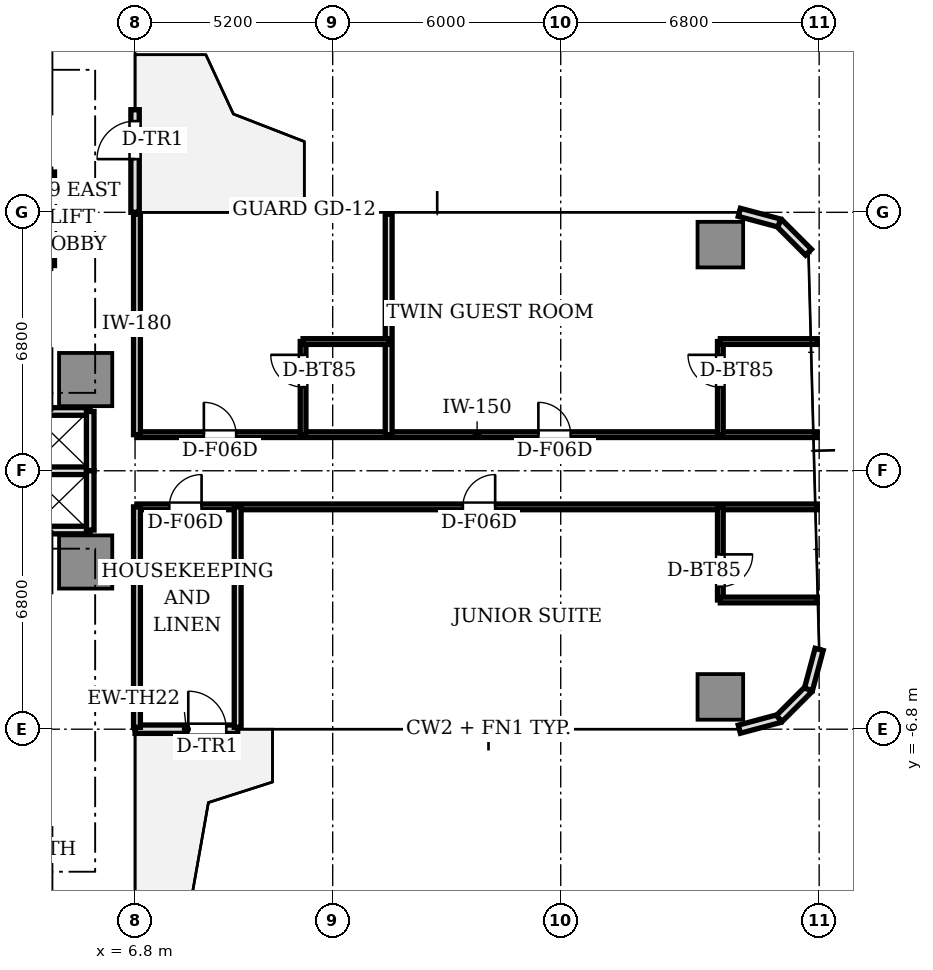
"""IFC4 building model, lengths in metres.
Left out: names, types, materials, properties, quantities, classifications, styles, units other than length and angle.
Written with IfcOpenShell. Run it as: python <this file> out.ifc"""

import sys

from ifc_helpers import new_model, si_unit, direction, frame, frame_2d, origin, origin_2d, place, context, subcontext, project, spatial, rectangle, extrude, source, transform, mapped, element, fill, save


model = new_model("IFC4")
c1 = context("Model", 3, precision=1e-05, world=origin(), true_north=direction((0.0, 1.0)))
c2 = subcontext(c1, "Body", "Model", "MODEL_VIEW")
j1 = project(units=[si_unit("LENGTHUNIT", "METRE"), si_unit("PLANEANGLEUNIT", "RADIAN")], contexts=[c1])
p1 = place(None, origin())
s1 = spatial("IfcSite", under=j1, at=p1, CompositionType="ELEMENT")
p2 = place(p1, origin())
s2 = spatial("IfcBuilding", under=s1, at=p2, CompositionType="ELEMENT")
p3 = place(p2, frame((0.0, 0.0, 71.15)))
s3 = spatial("IfcBuildingStorey", under=s2, at=p3, CompositionType="ELEMENT", Elevation=71.15)
m1 = source(origin(), c2, "Body", "SweptSolid", [
    extrude(rectangle(XDim=1.4, YDim=1.4, at=origin_2d()), origin(), (0.0, 0.0, 1.0), 3.03),
])
for number, where, z_axis, x_axis in (
    (1, (5.5, 2.4, 0.0), (0.0, 0.0, 1.0), (1.0, 0.0, 0.0)),
    (2, (5.5, -2.4, 0.0), (0.0, 0.0, 1.0), (1.0, 0.0, 0.0)),
):
    element("IfcColumn", number, at=place(p3, frame(where, z_axis=z_axis, x_axis=x_axis)), inside=s3, PredefinedType="COLUMN", context=c2, shape_type="MappedRepresentation", body=[
        mapped(m1, transform((0.0, 0.0, 0.0), scale=1.0)),
    ])
m2 = source(origin(), c2, "Body", "SweptSolid", [
    extrude(rectangle(XDim=1.2, YDim=1.2, at=origin_2d()), origin(), (0.0, 0.0, 1.0), 3.03),
])
for number, where, z_axis, x_axis in (
    (3, (22.2, -5.95, 0.0), (0.0, 0.0, 1.0), (1.0, 0.0, 0.0)),
    (4, (22.2, 5.95, 0.0), (0.0, 0.0, 1.0), (1.0, 0.0, 0.0)),
):
    element("IfcColumn", number, at=place(p3, frame(where, z_axis=z_axis, x_axis=x_axis)), inside=s3, PredefinedType="COLUMN", context=c2, shape_type="MappedRepresentation", body=[
        mapped(m2, transform((0.0, 0.0, 0.0), scale=1.0)),
    ])
p4 = place(p3, frame((6.8, -6.8, 0.0), z_axis=(0.0, 0.0, 1.0), x_axis=(1.0, 0.0, 0.0)))
e5 = element("IfcWall", 5, at=p4, inside=s3, PredefinedType="STANDARD", context=c2, shape_type="SweptSolid", body=[
    extrude(rectangle(XDim=2.7, YDim=0.22, at=frame_2d((1.35, 0.0))), origin(), (0.0, 0.0, 1.0), 3.03),
])
p5 = place(p4, frame((1.4, 0.0, 0.0)))
e6 = element("IfcOpeningElement", 6, at=p5, cuts=e5, PredefinedType="OPENING", context=c2, shape_type="SweptSolid", body=[
    extrude(rectangle(XDim=1.0, YDim=2.2, at=frame_2d((0.5, 1.1))), frame((0.0, 0.12, 0.0), z_axis=(0.0, -1.0, 0.0), x_axis=(1.0, 0.0, 0.0)), (0.0, 0.0, 1.0), 0.24),
])
for number, where, z_axis, x_axis in (
    (7, (22.7, -6.8, 0.0), (0.0, 0.0, 1.0), (0.966, 0.259, 0.0)),
    (8, (23.75, -6.519, 0.0), (0.0, 0.0, 1.0), (0.707, 0.707, 0.0)),
    (9, (24.519, -5.75, 0.0), (0.0, 0.0, 1.0), (0.259, 0.966, 0.0)),
    (10, (24.519, 5.75, 0.0), (0.0, 0.0, 1.0), (-0.707, 0.707, 0.0)),
    (11, (23.75, 6.519, 0.0), (0.0, 0.0, 1.0), (-0.966, 0.259, 0.0)),
):
    element("IfcWall", number, at=place(p3, frame(where, z_axis=z_axis, x_axis=x_axis)), inside=s3, PredefinedType="STANDARD", context=c2, shape_type="SweptSolid", body=[
        extrude(rectangle(XDim=1.087, YDim=0.22, at=frame_2d((0.543, 0.0))), origin(), (0.0, 0.0, 1.0), 3.03),
    ])
p6 = place(p3, frame((6.8, 6.8, 0.0), z_axis=(0.0, 0.0, 1.0), x_axis=(0.0, 1.0, 0.0)))
e12 = element("IfcWall", 12, at=p6, inside=s3, PredefinedType="STANDARD", context=c2, shape_type="SweptSolid", body=[
    extrude(rectangle(XDim=2.7, YDim=0.22, at=frame_2d((1.35, 0.0))), origin(), (0.0, 0.0, 1.0), 3.03),
])
p7 = place(p6, frame((1.4, 0.0, 0.0)))
e13 = element("IfcOpeningElement", 13, at=p7, cuts=e12, PredefinedType="OPENING", context=c2, shape_type="SweptSolid", body=[
    extrude(rectangle(XDim=1.0, YDim=2.2, at=frame_2d((0.5, 1.1))), frame((0.0, 0.12, 0.0), z_axis=(0.0, -1.0, 0.0), x_axis=(1.0, 0.0, 0.0)), (0.0, 0.0, 1.0), 0.24),
])
for number, where, z_axis, x_axis in (
    (14, (3.98, 1.56, 0.0), (0.0, 0.0, 1.0), (1.0, 0.0, 0.0)),
    (15, (3.98, -1.56, 0.0), (0.0, 0.0, 1.0), (1.0, 0.0, 0.0)),
    (16, (3.98, 0.0, 0.0), (0.0, 0.0, 1.0), (1.0, 0.0, 0.0)),
):
    element("IfcWall", number, at=place(p3, frame(where, z_axis=z_axis, x_axis=x_axis)), inside=s3, PredefinedType="SOLIDWALL", context=c2, shape_type="SweptSolid", body=[
        extrude(rectangle(XDim=1.64, YDim=0.2, at=frame_2d((0.82, 0.0))), origin(), (0.0, 0.0, 1.0), 2.58),
    ])
for number, where, z_axis, x_axis in (
    (17, (5.62, 0.0, 0.0), (0.0, 0.0, 1.0), (0.0, 1.0, 0.0)),
    (18, (5.62, -1.56, 0.0), (0.0, 0.0, 1.0), (0.0, 1.0, 0.0)),
):
    element("IfcWall", number, at=place(p3, frame(where, z_axis=z_axis, x_axis=x_axis)), inside=s3, PredefinedType="SOLIDWALL", context=c2, shape_type="SweptSolid", body=[
        extrude(rectangle(XDim=1.56, YDim=0.2, at=frame_2d((0.78, 0.0))), origin(), (0.0, 0.0, 1.0), 2.58),
    ])
p8 = place(p3, frame((4.58, 5.4, 0.0), z_axis=(0.0, 0.0, 1.0), x_axis=(0.0, 1.0, 0.0)))
e19 = element("IfcWall", 19, at=p8, inside=s3, PredefinedType="SOLIDWALL", context=c2, shape_type="SweptSolid", body=[
    extrude(rectangle(XDim=2.46, YDim=0.2, at=frame_2d((1.23, 0.0))), origin(), (0.0, 0.0, 1.0), 2.58),
])
p9 = place(p8, frame((0.2, 0.0, 0.0)))
e20 = element("IfcOpeningElement", 20, at=p9, cuts=e19, PredefinedType="OPENING", context=c2, shape_type="SweptSolid", body=[
    extrude(rectangle(XDim=0.85, YDim=2.1, at=frame_2d((0.425, 1.05))), frame((0.0, 0.11, 0.0), z_axis=(0.0, -1.0, 0.0), x_axis=(1.0, 0.0, 0.0)), (0.0, 0.0, 1.0), 0.22),
])
p10 = place(p8, frame((1.38, 0.0, 0.0)))
e21 = element("IfcOpeningElement", 21, at=p10, cuts=e19, PredefinedType="OPENING", context=c2, shape_type="SweptSolid", body=[
    extrude(rectangle(XDim=0.85, YDim=2.1, at=frame_2d((0.425, 1.05))), frame((0.0, 0.11, 0.0), z_axis=(0.0, -1.0, 0.0), x_axis=(1.0, 0.0, 0.0)), (0.0, 0.0, 1.0), 0.22),
])
p11 = place(p3, frame((6.85, 0.95, 0.0), z_axis=(0.0, 0.0, 1.0), x_axis=(1.0, 0.0, 0.0)))
e22 = element("IfcWall", 22, at=p11, inside=s3, PredefinedType="PARTITIONING", context=c2, shape_type="SweptSolid", body=[
    extrude(rectangle(XDim=17.9, YDim=0.15, at=frame_2d((8.95, 0.0))), origin(), (0.0, 0.0, 1.0), 2.58),
])
p12 = place(p11, frame((1.76, 0.0, 0.0)))
e23 = element("IfcOpeningElement", 23, at=p12, cuts=e22, PredefinedType="OPENING", context=c2, shape_type="SweptSolid", body=[
    extrude(rectangle(XDim=0.85, YDim=2.1, at=frame_2d((0.425, 1.05))), frame((0.0, 0.085, 0.0), z_axis=(0.0, -1.0, 0.0), x_axis=(1.0, 0.0, 0.0)), (0.0, 0.0, 1.0), 0.17),
])
p13 = place(p11, frame((10.562, 0.0, 0.0)))
e24 = element("IfcOpeningElement", 24, at=p13, cuts=e22, PredefinedType="OPENING", context=c2, shape_type="SweptSolid", body=[
    extrude(rectangle(XDim=0.85, YDim=2.1, at=frame_2d((0.425, 1.05))), frame((0.0, 0.085, 0.0), z_axis=(0.0, -1.0, 0.0), x_axis=(1.0, 0.0, 0.0)), (0.0, 0.0, 1.0), 0.17),
])
p14 = place(p3, frame((6.85, -0.95, 0.0), z_axis=(0.0, 0.0, 1.0), x_axis=(1.0, 0.0, 0.0)))
e25 = element("IfcWall", 25, at=p14, inside=s3, PredefinedType="PARTITIONING", context=c2, shape_type="SweptSolid", body=[
    extrude(rectangle(XDim=17.9, YDim=0.15, at=frame_2d((8.95, 0.0))), origin(), (0.0, 0.0, 1.0), 2.58),
])
p15 = place(p14, frame((0.85, 0.0, 0.0)))
e26 = element("IfcOpeningElement", 26, at=p15, cuts=e25, PredefinedType="OPENING", context=c2, shape_type="SweptSolid", body=[
    extrude(rectangle(XDim=0.85, YDim=2.1, at=frame_2d((0.425, 1.05))), frame((0.0, 0.085, 0.0), z_axis=(0.0, -1.0, 0.0), x_axis=(1.0, 0.0, 0.0)), (0.0, 0.0, 1.0), 0.17),
])
p16 = place(p14, frame((8.575, 0.0, 0.0)))
e27 = element("IfcOpeningElement", 27, at=p16, cuts=e25, PredefinedType="OPENING", context=c2, shape_type="SweptSolid", body=[
    extrude(rectangle(XDim=0.85, YDim=2.1, at=frame_2d((0.425, 1.05))), frame((0.0, 0.085, 0.0), z_axis=(0.0, -1.0, 0.0), x_axis=(1.0, 0.0, 0.0)), (0.0, 0.0, 1.0), 0.17),
])
for number, where, z_axis, x_axis in (
    (28, (6.85, 0.95, 0.0), (0.0, 0.0, 1.0), (0.0, 1.0, 0.0)),
    (29, (6.85, -6.75, 0.0), (0.0, 0.0, 1.0), (0.0, 1.0, 0.0)),
    (30, (13.473, 0.95, 0.0), (0.0, 0.0, 1.0), (0.0, 1.0, 0.0)),
):
    element("IfcWall", number, at=place(p3, frame(where, z_axis=z_axis, x_axis=x_axis)), inside=s3, PredefinedType="PARTITIONING", context=c2, shape_type="SweptSolid", body=[
        extrude(rectangle(XDim=5.8, YDim=0.18, at=frame_2d((2.9, 0.0))), origin(), (0.0, 0.0, 1.0), 2.58),
    ])
p17 = place(p3, frame((11.221, 0.95, 0.0), z_axis=(0.0, 0.0, 1.0), x_axis=(0.0, 1.0, 0.0)))
e31 = element("IfcWall", 31, at=p17, inside=s3, PredefinedType="PARTITIONING", context=c2, shape_type="SweptSolid", body=[
    extrude(rectangle(XDim=2.45, YDim=0.15, at=frame_2d((1.225, 0.0))), origin(), (0.0, 0.0, 1.0), 2.58),
])
p18 = place(p17, frame((1.25, 0.0, 0.0)))
e32 = element("IfcOpeningElement", 32, at=p18, cuts=e31, PredefinedType="OPENING", context=c2, shape_type="SweptSolid", body=[
    extrude(rectangle(XDim=0.85, YDim=2.1, at=frame_2d((0.425, 1.05))), frame((0.0, 0.085, 0.0), z_axis=(0.0, -1.0, 0.0), x_axis=(1.0, 0.0, 0.0)), (0.0, 0.0, 1.0), 0.17),
])
p19 = place(p3, frame((11.221, 3.4, 0.0), z_axis=(0.0, 0.0, 1.0), x_axis=(1.0, 0.0, 0.0)))
e33 = element("IfcWall", 33, at=p19, inside=s3, PredefinedType="PARTITIONING", context=c2, shape_type="SweptSolid", body=[
    extrude(rectangle(XDim=2.252, YDim=0.15, at=frame_2d((1.126, 0.0))), origin(), (0.0, 0.0, 1.0), 2.55),
])
p20 = place(p3, frame((22.2, 0.95, 0.0), z_axis=(0.0, 0.0, 1.0), x_axis=(0.0, 1.0, 0.0)))
e34 = element("IfcWall", 34, at=p20, inside=s3, PredefinedType="PARTITIONING", context=c2, shape_type="SweptSolid", body=[
    extrude(rectangle(XDim=2.45, YDim=0.15, at=frame_2d((1.225, 0.0))), origin(), (0.0, 0.0, 1.0), 2.5),
])
p21 = place(p20, frame((1.25, 0.0, 0.0)))
e35 = element("IfcOpeningElement", 35, at=p21, cuts=e34, PredefinedType="OPENING", context=c2, shape_type="SweptSolid", body=[
    extrude(rectangle(XDim=0.85, YDim=2.1, at=frame_2d((0.425, 1.05))), frame((0.0, 0.085, 0.0), z_axis=(0.0, -1.0, 0.0), x_axis=(1.0, 0.0, 0.0)), (0.0, 0.0, 1.0), 0.17),
])
p22 = place(p3, frame((22.2, 3.4, 0.0), z_axis=(0.0, 0.0, 1.0), x_axis=(1.0, 0.0, 0.0)))
e36 = element("IfcWall", 36, at=p22, inside=s3, PredefinedType="PARTITIONING", context=c2, shape_type="SweptSolid", body=[
    extrude(rectangle(XDim=2.55, YDim=0.15, at=frame_2d((1.275, 0.0))), origin(), (0.0, 0.0, 1.0), 2.58),
])
p23 = place(p3, frame((9.5, -0.95, 0.0), z_axis=(0.0, 0.0, 1.0), x_axis=(0.0, -1.0, 0.0)))
e37 = element("IfcWall", 37, at=p23, inside=s3, PredefinedType="PARTITIONING", context=c2, shape_type="SweptSolid", body=[
    extrude(rectangle(XDim=5.8, YDim=0.18, at=frame_2d((2.9, 0.0))), origin(), (0.0, 0.0, 1.0), 2.58),
])
p24 = place(p3, frame((22.2, -0.95, 0.0), z_axis=(0.0, 0.0, 1.0), x_axis=(0.0, -1.0, 0.0)))
e38 = element("IfcWall", 38, at=p24, inside=s3, PredefinedType="PARTITIONING", context=c2, shape_type="SweptSolid", body=[
    extrude(rectangle(XDim=2.45, YDim=0.15, at=frame_2d((1.225, 0.0))), origin(), (0.0, 0.0, 1.0), 2.5),
])
p25 = place(p24, frame((1.25, 0.0, 0.0)))
e39 = element("IfcOpeningElement", 39, at=p25, cuts=e38, PredefinedType="OPENING", context=c2, shape_type="SweptSolid", body=[
    extrude(rectangle(XDim=0.85, YDim=2.1, at=frame_2d((0.425, 1.05))), frame((0.0, 0.085, 0.0), z_axis=(0.0, -1.0, 0.0), x_axis=(1.0, 0.0, 0.0)), (0.0, 0.0, 1.0), 0.17),
])
p26 = place(p3, frame((22.2, -3.4, 0.0), z_axis=(0.0, 0.0, 1.0), x_axis=(1.0, 0.0, 0.0)))
e40 = element("IfcWall", 40, at=p26, inside=s3, PredefinedType="PARTITIONING", context=c2, shape_type="SweptSolid", body=[
    extrude(rectangle(XDim=2.55, YDim=0.15, at=frame_2d((1.275, 0.0))), origin(), (0.0, 0.0, 1.0), 2.58),
])
m3 = source(origin(), c2, "Body", "SweptSolid", [
    extrude(rectangle(XDim=1.0, YDim=0.05, at=origin_2d()), origin(), (0.0, 0.0, 1.0), 2.2),
])
p27 = place(p5, frame((0.5, 0.0, 0.0)))
e41 = element("IfcDoor", 41, at=p27, inside=s3, OperationType="SINGLE_SWING_LEFT", PredefinedType="DOOR", context=c2, shape_type="MappedRepresentation", body=[
    mapped(m3, transform((0.0, 0.0, 0.0), scale=1.0)),
])
fill(e6, e41)
p28 = place(p7, frame((0.5, 0.0, 0.0)))
e42 = element("IfcDoor", 42, at=p28, inside=s3, OperationType="SINGLE_SWING_LEFT", PredefinedType="DOOR", context=c2, shape_type="MappedRepresentation", body=[
    mapped(m3, transform((0.0, 0.0, 0.0), scale=1.0)),
])
fill(e13, e42)
m4 = source(origin(), c2, "Body", "SweptSolid", [
    extrude(rectangle(XDim=0.85, YDim=0.05, at=origin_2d()), origin(), (0.0, 0.0, 1.0), 2.1),
])
p29 = place(p18, frame((0.425, 0.0, 0.0)))
e43 = element("IfcDoor", 43, at=p29, inside=s3, OperationType="SINGLE_SWING_RIGHT", PredefinedType="DOOR", context=c2, shape_type="MappedRepresentation", body=[
    mapped(m4, transform((0.0, 0.0, 0.0), scale=1.0)),
])
fill(e32, e43)
p30 = place(p12, frame((0.425, 0.0, 0.0)))
e44 = element("IfcDoor", 44, at=p30, inside=s3, OperationType="SINGLE_SWING_LEFT", PredefinedType="DOOR", context=c2, shape_type="MappedRepresentation", body=[
    mapped(m4, transform((0.0, 0.0, 0.0), scale=1.0)),
])
fill(e23, e44)
p31 = place(p21, frame((0.425, 0.0, 0.0)))
e45 = element("IfcDoor", 45, at=p31, inside=s3, OperationType="SINGLE_SWING_RIGHT", PredefinedType="DOOR", context=c2, shape_type="MappedRepresentation", body=[
    mapped(m4, transform((0.0, 0.0, 0.0), scale=1.0)),
])
fill(e35, e45)
p32 = place(p13, frame((0.425, 0.0, 0.0)))
e46 = element("IfcDoor", 46, at=p32, inside=s3, OperationType="SINGLE_SWING_LEFT", PredefinedType="DOOR", context=c2, shape_type="MappedRepresentation", body=[
    mapped(m4, transform((0.0, 0.0, 0.0), scale=1.0)),
])
fill(e24, e46)
p33 = place(p15, frame((0.425, 0.0, 0.0)))
e47 = element("IfcDoor", 47, at=p33, inside=s3, OperationType="SINGLE_SWING_RIGHT", PredefinedType="DOOR", context=c2, shape_type="MappedRepresentation", body=[
    mapped(m4, transform((0.0, 0.0, 0.0), scale=1.0)),
])
fill(e26, e47)
p34 = place(p25, frame((0.425, 0.0, 0.0)))
e48 = element("IfcDoor", 48, at=p34, inside=s3, OperationType="SINGLE_SWING_LEFT", PredefinedType="DOOR", context=c2, shape_type="MappedRepresentation", body=[
    mapped(m4, transform((0.0, 0.0, 0.0), scale=1.0)),
])
fill(e39, e48)
p35 = place(p16, frame((0.425, 0.0, 0.0)))
e49 = element("IfcDoor", 49, at=p35, inside=s3, OperationType="SINGLE_SWING_RIGHT", PredefinedType="DOOR", context=c2, shape_type="MappedRepresentation", body=[
    mapped(m4, transform((0.0, 0.0, 0.0), scale=1.0)),
])
fill(e27, e49)
save(model, sys.argv[1])
